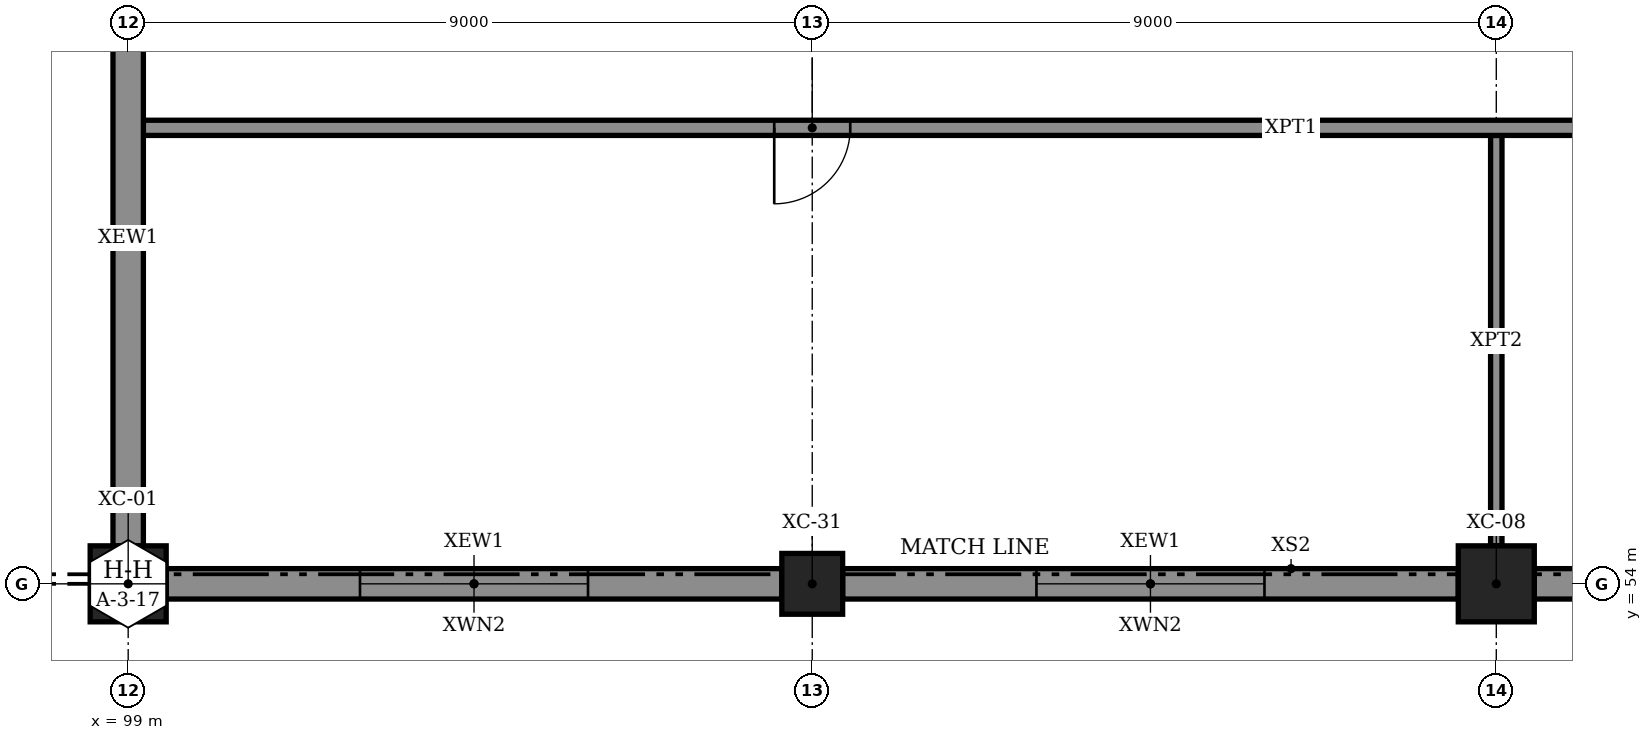
"""IFC4 building model, lengths in metres.
Left out: names, types, materials, properties, quantities, classifications, styles, units other than length and angle.
Written with IfcOpenShell. Run it as: python <this file> out.ifc"""

import sys

from ifc_helpers import new_model, si_unit, direction, frame, frame_2d, origin, origin_2d, place, context, subcontext, project, spatial, rectangle, hollow_rectangle, extrude, element, fill, save


model = new_model("IFC4")
c1 = context("Model", 3, precision=1e-05, world=origin(), true_north=direction((0.0, 1.0)))
c2 = subcontext(c1, "Body", "Model", "MODEL_VIEW")
j1 = project(units=[si_unit("LENGTHUNIT", "METRE"), si_unit("PLANEANGLEUNIT", "RADIAN")], contexts=[c1])
p1 = place(None, origin())
s1 = spatial("IfcSite", under=j1, at=p1, CompositionType="ELEMENT")
p2 = place(p1, origin())
s2 = spatial("IfcBuilding", under=s1, at=p2, CompositionType="ELEMENT")
p3 = place(p2, frame((0.0, 0.0, 6.0)))
s3 = spatial("IfcBuildingStorey", under=s2, at=p3, CompositionType="ELEMENT", Elevation=6.0)
for number, where, z_axis, x_axis in (
    (1, (99.0, 54.0, 0.0), (0.0, 0.0, 1.0), (1.0, 0.0, 0.0)),
    (2, (117.0, 54.0, 0.0), (0.0, 0.0, 1.0), (1.0, 0.0, 0.0)),
):
    element("IfcColumn", number, at=place(p3, frame(where, z_axis=z_axis, x_axis=x_axis)), inside=s3, PredefinedType="COLUMN", context=c2, shape_type="SweptSolid", body=[
        extrude(hollow_rectangle(XDim=1.0, YDim=1.0, WallThickness=0.032, at=origin_2d()), origin(), (0.0, 0.0, 1.0), 5.5),
    ])
p4 = place(p3, frame((108.0, 54.0, 0.0), z_axis=(0.0, 0.0, 1.0), x_axis=(1.0, 0.0, 0.0)))
e3 = element("IfcColumn", 3, at=p4, inside=s3, PredefinedType="COLUMN", context=c2, shape_type="SweptSolid", body=[
    extrude(rectangle(XDim=0.8, YDim=0.8, at=origin_2d()), origin(), (0.0, 0.0, 1.0), 5.5),
])
p5 = place(p3, frame((99.5, 54.0, -0.28), z_axis=(0.0, 0.0, 1.0), x_axis=(1.0, 0.0, 0.0)))
e4 = element("IfcWall", 4, at=p5, inside=s3, PredefinedType="SOLIDWALL", context=c2, shape_type="SweptSolid", body=[
    extrude(rectangle(XDim=8.1, YDim=0.4, at=frame_2d((4.05, 0.0))), origin(), (0.0, 0.0, 1.0), 5.78),
])
p6 = place(p5, frame((2.55, 0.0, 1.18)))
e5 = element("IfcOpeningElement", 5, at=p6, cuts=e4, PredefinedType="OPENING", context=c2, shape_type="SweptSolid", body=[
    extrude(rectangle(XDim=3.0, YDim=1.8, at=frame_2d((1.5, 0.9))), frame((0.0, 0.21, 0.0), z_axis=(0.0, -1.0, 0.0), x_axis=(1.0, 0.0, 0.0)), (0.0, 0.0, 1.0), 0.42),
])
p7 = place(p3, frame((108.4, 54.0, -0.28), z_axis=(0.0, 0.0, 1.0), x_axis=(1.0, 0.0, 0.0)))
e6 = element("IfcWall", 6, at=p7, inside=s3, PredefinedType="SOLIDWALL", context=c2, shape_type="SweptSolid", body=[
    extrude(rectangle(XDim=8.1, YDim=0.4, at=frame_2d((4.05, 0.0))), origin(), (0.0, 0.0, 1.0), 5.78),
])
p8 = place(p7, frame((2.55, 0.0, 1.18)))
e7 = element("IfcOpeningElement", 7, at=p8, cuts=e6, PredefinedType="OPENING", context=c2, shape_type="SweptSolid", body=[
    extrude(rectangle(XDim=3.0, YDim=1.8, at=frame_2d((1.5, 0.9))), frame((0.0, 0.21, 0.0), z_axis=(0.0, -1.0, 0.0), x_axis=(1.0, 0.0, 0.0)), (0.0, 0.0, 1.0), 0.42),
])
p9 = place(p3, frame((117.5, 54.0, -0.28), z_axis=(0.0, 0.0, 1.0), x_axis=(1.0, 0.0, 0.0)))
e8 = element("IfcWall", 8, at=p9, inside=s3, PredefinedType="SOLIDWALL", context=c2, shape_type="SweptSolid", body=[
    extrude(rectangle(XDim=8.5, YDim=0.4, at=frame_2d((4.25, 0.0))), origin(), (0.0, 0.0, 1.0), 5.78),
])
p10 = place(p9, frame((2.75, 0.0, 1.18)))
e9 = element("IfcOpeningElement", 9, at=p10, cuts=e8, PredefinedType="OPENING", context=c2, shape_type="SweptSolid", body=[
    extrude(rectangle(XDim=3.0, YDim=1.8, at=frame_2d((1.5, 0.9))), frame((0.0, 0.21, 0.0), z_axis=(0.0, -1.0, 0.0), x_axis=(1.0, 0.0, 0.0)), (0.0, 0.0, 1.0), 0.42),
])
p11 = place(p3, frame((99.0, 54.5, -0.28), z_axis=(0.0, 0.0, 1.0), x_axis=(0.0, 1.0, 0.0)))
e10 = element("IfcWall", 10, at=p11, inside=s3, PredefinedType="SOLIDWALL", context=c2, shape_type="SweptSolid", body=[
    extrude(rectangle(XDim=8.1, YDim=0.4, at=frame_2d((4.05, 0.0))), origin(), (0.0, 0.0, 1.0), 5.78),
])
p12 = place(p3, frame((99.2, 60.0, 0.0), z_axis=(0.0, 0.0, 1.0), x_axis=(1.0, 0.0, 0.0)))
e11 = element("IfcWall", 11, at=p12, inside=s3, PredefinedType="PARTITIONING", context=c2, shape_type="SweptSolid", body=[
    extrude(rectangle(XDim=161.6, YDim=0.2, at=frame_2d((80.8, 0.0))), origin(), (0.0, 0.0, 1.0), 5.25),
])
p13 = place(p12, frame((8.3, 0.0, 0.015)))
e12 = element("IfcOpeningElement", 12, at=p13, cuts=e11, PredefinedType="OPENING", context=c2, shape_type="SweptSolid", body=[
    extrude(rectangle(XDim=1.0, YDim=2.4, at=frame_2d((0.5, 1.2))), frame((0.0, 0.11, 0.0), z_axis=(0.0, -1.0, 0.0), x_axis=(1.0, 0.0, 0.0)), (0.0, 0.0, 1.0), 0.22),
])
p14 = place(p12, frame((26.3, 0.0, 0.015)))
e13 = element("IfcOpeningElement", 13, at=p14, cuts=e11, PredefinedType="OPENING", context=c2, shape_type="SweptSolid", body=[
    extrude(rectangle(XDim=1.0, YDim=2.4, at=frame_2d((0.5, 1.2))), frame((0.0, 0.11, 0.0), z_axis=(0.0, -1.0, 0.0), x_axis=(1.0, 0.0, 0.0)), (0.0, 0.0, 1.0), 0.22),
])
p15 = place(p12, frame((44.3, 0.0, 0.015)))
e14 = element("IfcOpeningElement", 14, at=p15, cuts=e11, PredefinedType="OPENING", context=c2, shape_type="SweptSolid", body=[
    extrude(rectangle(XDim=1.0, YDim=2.4, at=frame_2d((0.5, 1.2))), frame((0.0, 0.11, 0.0), z_axis=(0.0, -1.0, 0.0), x_axis=(1.0, 0.0, 0.0)), (0.0, 0.0, 1.0), 0.22),
])
p16 = place(p12, frame((66.8, 0.0, 0.015)))
e15 = element("IfcOpeningElement", 15, at=p16, cuts=e11, PredefinedType="OPENING", context=c2, shape_type="SweptSolid", body=[
    extrude(rectangle(XDim=1.0, YDim=2.4, at=frame_2d((0.5, 1.2))), frame((0.0, 0.11, 0.0), z_axis=(0.0, -1.0, 0.0), x_axis=(1.0, 0.0, 0.0)), (0.0, 0.0, 1.0), 0.22),
])
p17 = place(p12, frame((89.3, 0.0, 0.015)))
e16 = element("IfcOpeningElement", 16, at=p17, cuts=e11, PredefinedType="OPENING", context=c2, shape_type="SweptSolid", body=[
    extrude(rectangle(XDim=1.0, YDim=2.4, at=frame_2d((0.5, 1.2))), frame((0.0, 0.11, 0.0), z_axis=(0.0, -1.0, 0.0), x_axis=(1.0, 0.0, 0.0)), (0.0, 0.0, 1.0), 0.22),
])
p18 = place(p12, frame((107.3, 0.0, 0.015)))
e17 = element("IfcOpeningElement", 17, at=p18, cuts=e11, PredefinedType="OPENING", context=c2, shape_type="SweptSolid", body=[
    extrude(rectangle(XDim=1.0, YDim=2.4, at=frame_2d((0.5, 1.2))), frame((0.0, 0.11, 0.0), z_axis=(0.0, -1.0, 0.0), x_axis=(1.0, 0.0, 0.0)), (0.0, 0.0, 1.0), 0.22),
])
p19 = place(p12, frame((125.3, 0.0, 0.015)))
e18 = element("IfcOpeningElement", 18, at=p19, cuts=e11, PredefinedType="OPENING", context=c2, shape_type="SweptSolid", body=[
    extrude(rectangle(XDim=1.0, YDim=2.4, at=frame_2d((0.5, 1.2))), frame((0.0, 0.11, 0.0), z_axis=(0.0, -1.0, 0.0), x_axis=(1.0, 0.0, 0.0)), (0.0, 0.0, 1.0), 0.22),
])
p20 = place(p12, frame((147.8, 0.0, 0.015)))
e19 = element("IfcOpeningElement", 19, at=p20, cuts=e11, PredefinedType="OPENING", context=c2, shape_type="SweptSolid", body=[
    extrude(rectangle(XDim=1.0, YDim=2.4, at=frame_2d((0.5, 1.2))), frame((0.0, 0.11, 0.0), z_axis=(0.0, -1.0, 0.0), x_axis=(1.0, 0.0, 0.0)), (0.0, 0.0, 1.0), 0.22),
])
p21 = place(p3, frame((117.0, 54.5, 0.0), z_axis=(0.0, 0.0, 1.0), x_axis=(0.0, 1.0, 0.0)))
e20 = element("IfcWall", 20, at=p21, inside=s3, PredefinedType="PARTITIONING", context=c2, shape_type="SweptSolid", body=[
    extrude(rectangle(XDim=5.4, YDim=0.15, at=frame_2d((2.7, 0.0))), origin(), (0.0, 0.0, 1.0), 5.25),
])
p22 = place(p6, origin())
e21 = element("IfcWindow", 21, at=p22, inside=s3, PartitioningType="TRIPLE_PANEL_VERTICAL", PredefinedType="WINDOW", context=c2, shape_type="SweptSolid", body=[
    extrude(rectangle(XDim=3.0, YDim=1.8, at=frame_2d((1.5, 0.9))), frame((0.0, 0.03, 0.0), z_axis=(0.0, -1.0, 0.0), x_axis=(1.0, 0.0, 0.0)), (0.0, 0.0, 1.0), 0.06),
])
fill(e5, e21)
p23 = place(p8, origin())
e22 = element("IfcWindow", 22, at=p23, inside=s3, PartitioningType="TRIPLE_PANEL_VERTICAL", PredefinedType="WINDOW", context=c2, shape_type="SweptSolid", body=[
    extrude(rectangle(XDim=3.0, YDim=1.8, at=frame_2d((1.5, 0.9))), frame((0.0, 0.03, 0.0), z_axis=(0.0, -1.0, 0.0), x_axis=(1.0, 0.0, 0.0)), (0.0, 0.0, 1.0), 0.06),
])
fill(e7, e22)
p24 = place(p13, frame((1.0, 0.0, 0.0), z_axis=(0.0, 0.0, 1.0), x_axis=(-1.0, 0.0, 0.0)))
e23 = element("IfcDoor", 23, at=p24, inside=s3, OperationType="SINGLE_SWING_LEFT", PredefinedType="DOOR", context=c2, shape_type="SweptSolid", body=[
    extrude(rectangle(XDim=1.0, YDim=2.4, at=frame_2d((0.5, 1.2))), frame((0.0, 0.025, 0.0), z_axis=(0.0, -1.0, 0.0), x_axis=(1.0, 0.0, 0.0)), (0.0, 0.0, 1.0), 0.05),
])
fill(e12, e23)
save(model, sys.argv[1])
